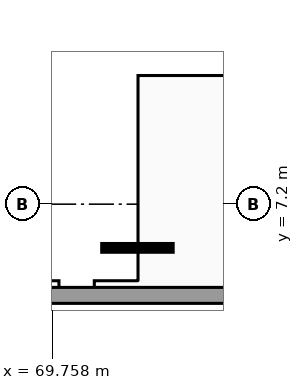
"""IFC4 building model, lengths in metres.
Left out: names, types, materials, properties, quantities, classifications, styles, units other than length and angle.
Written with IfcOpenShell. Run it as: python <this file> out.ifc"""

import sys

from ifc_helpers import new_model, si_unit, direction, frame, frame_2d, origin, place, context, subcontext, project, spatial, rectangle, extrude, element, save


model = new_model("IFC4")
c1 = context("Model", 3, precision=1e-05, world=origin(), true_north=direction((0.0, 1.0)))
c2 = subcontext(c1, "Body", "Model", "MODEL_VIEW")
j1 = project(units=[si_unit("LENGTHUNIT", "METRE"), si_unit("PLANEANGLEUNIT", "RADIAN")], contexts=[c1])
p1 = place(None, origin())
s1 = spatial("IfcSite", under=j1, at=p1, CompositionType="ELEMENT")
p2 = place(p1, origin())
s2 = spatial("IfcBuilding", under=s1, at=p2, CompositionType="ELEMENT")
p3 = place(p2, frame((0.0, 0.0, -8.16)))
s3 = spatial("IfcBuildingStorey", under=s2, at=p3, CompositionType="ELEMENT", Elevation=-8.16)
p4 = place(p3, frame((1.7, 4.8, 0.0), z_axis=(0.0, 0.0, 1.0), x_axis=(1.0, 0.0, 0.0)))
e1 = element("IfcWall", 1, at=p4, inside=s3, PredefinedType="SOLIDWALL", context=c2, shape_type="SweptSolid", body=[
    extrude(rectangle(XDim=73.4, YDim=0.42, at=frame_2d((36.7, 0.0))), origin(), (0.0, 0.0, 1.0), 3.76),
])
save(model, sys.argv[1])
